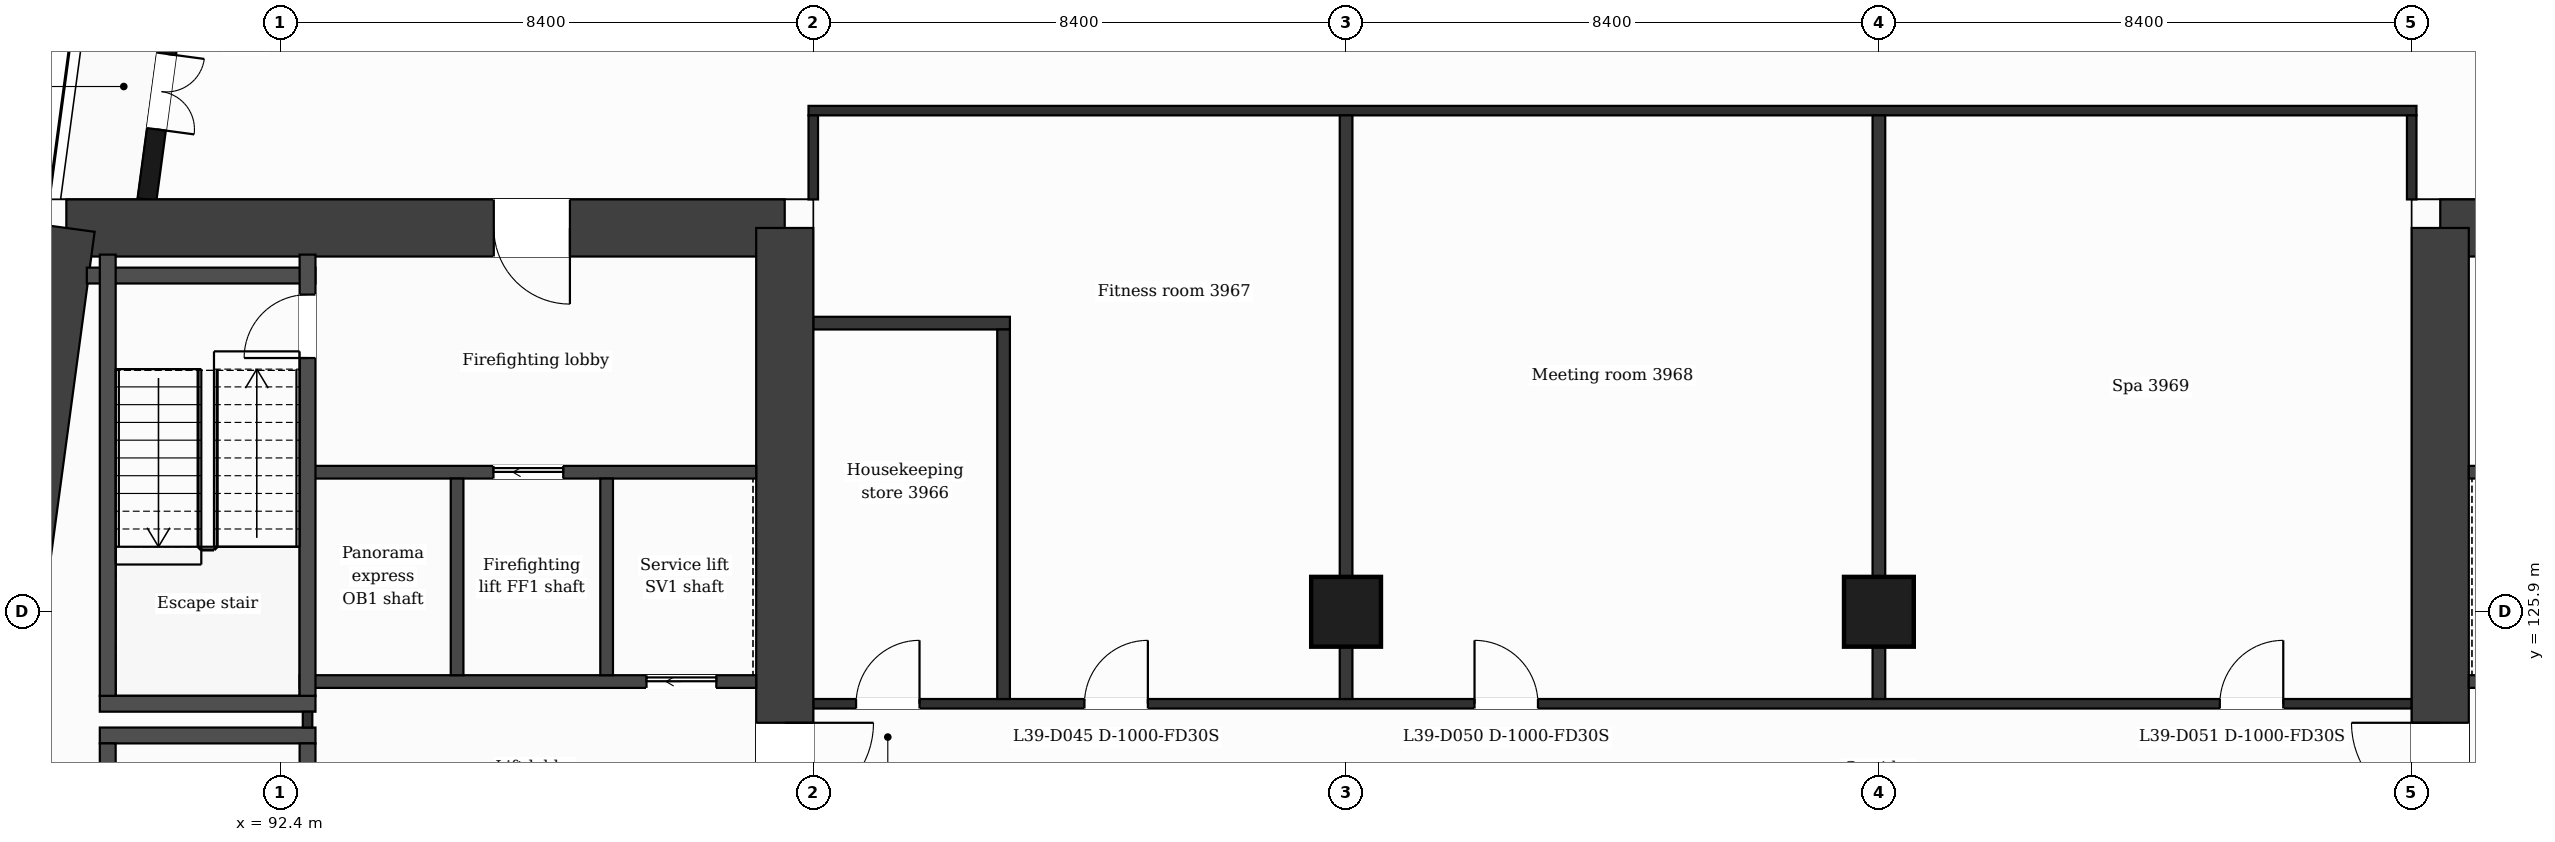
"""IFC4 building model, lengths in metres.
Left out: names, types, materials, properties, quantities, classifications, styles, units other than length and angle.
Written with IfcOpenShell. Run it as: python <this file> out.ifc"""

import sys

from ifc_helpers import new_model, si_unit, direction, frame, frame_2d, origin, origin_2d, place, context, subcontext, project, spatial, rectangle, extrude, element, fill, save


model = new_model("IFC4")
c1 = context("Model", 3, precision=1e-05, world=origin(), true_north=direction((0.0, 1.0)))
c2 = subcontext(c1, "Body", "Model", "MODEL_VIEW")
j1 = project(units=[si_unit("LENGTHUNIT", "METRE"), si_unit("PLANEANGLEUNIT", "RADIAN")], contexts=[c1])
p1 = place(None, origin())
s1 = spatial("IfcSite", under=j1, at=p1, CompositionType="ELEMENT")
p2 = place(p1, origin())
s2 = spatial("IfcBuilding", under=s1, at=p2, CompositionType="ELEMENT")
p3 = place(p2, frame((0.0, 0.0, 166.3)))
s3 = spatial("IfcBuildingStorey", under=s2, at=p3, CompositionType="ELEMENT", Elevation=166.3)
p4 = place(p3, frame((89.024, 131.95, 0.0), z_axis=(0.0, 0.0, 1.0), x_axis=(1.0, 0.0, 0.0)))
e1 = element("IfcWall", 1, at=p4, inside=s3, PredefinedType="SHEAR", context=c2, shape_type="SweptSolid", body=[
    extrude(rectangle(XDim=11.326, YDim=0.9, at=frame_2d((5.663, 0.0))), origin(), (0.0, 0.0, 1.0), 3.7),
])
p5 = place(p4, frame((6.739, 0.0, 0.0)))
e2 = element("IfcOpeningElement", 2, at=p5, cuts=e1, PredefinedType="OPENING", context=c2, shape_type="SweptSolid", body=[
    extrude(rectangle(XDim=1.2, YDim=2.1, at=frame_2d((0.6, 1.05))), frame((0.0, 0.46, 0.0), z_axis=(0.0, -1.0, 0.0), x_axis=(1.0, 0.0, 0.0)), (0.0, 0.0, 1.0), 0.92),
])
p6 = place(p3, frame((100.35, 131.95, 0.0), z_axis=(0.0, 0.0, 1.0), x_axis=(0.0, -1.0, 0.0)))
e3 = element("IfcWall", 3, at=p6, inside=s3, PredefinedType="SHEAR", context=c2, shape_type="SweptSolid", body=[
    extrude(rectangle(XDim=21.1, YDim=0.9, at=frame_2d((10.55, 0.0))), origin(), (0.0, 0.0, 1.0), 3.7),
])
p7 = place(p6, frame((7.8, 0.0, 0.0)))
e4 = element("IfcOpeningElement", 4, at=p7, cuts=e3, PredefinedType="OPENING", context=c2, shape_type="SweptSolid", body=[
    extrude(rectangle(XDim=1.4, YDim=2.1, at=frame_2d((0.7, 1.05))), frame((0.0, 0.46, 0.0), z_axis=(0.0, -1.0, 0.0), x_axis=(1.0, 0.0, 0.0)), (0.0, 0.0, 1.0), 0.92),
])
p8 = place(p3, frame((86.184, 110.85, 0.0), z_axis=(0.0, 0.0, 1.0), x_axis=(0.133410495943, 0.991060865725, 0.0)))
e5 = element("IfcWall", 5, at=p8, inside=s3, PredefinedType="SHEAR", context=c2, shape_type="SweptSolid", body=[
    extrude(rectangle(XDim=21.29, YDim=0.9, at=frame_2d((10.645, 0.0))), origin(), (0.0, 0.0, 1.0), 3.7),
])
p9 = place(p3, frame((126.45, 131.95, 0.0), z_axis=(0.0, 0.0, 1.0), x_axis=(1.0, 0.0, 0.0)))
e6 = element("IfcWall", 6, at=p9, inside=s3, PredefinedType="SHEAR", context=c2, shape_type="SweptSolid", body=[
    extrude(rectangle(XDim=11.326, YDim=0.9, at=frame_2d((5.663, 0.0))), origin(), (0.0, 0.0, 1.0), 3.7),
])
p10 = place(p9, frame((3.386, 0.0, 0.0)))
e7 = element("IfcOpeningElement", 7, at=p10, cuts=e6, PredefinedType="OPENING", context=c2, shape_type="SweptSolid", body=[
    extrude(rectangle(XDim=1.2, YDim=2.1, at=frame_2d((0.6, 1.05))), frame((0.0, 0.46, 0.0), z_axis=(0.0, -1.0, 0.0), x_axis=(1.0, 0.0, 0.0)), (0.0, 0.0, 1.0), 0.92),
])
p11 = place(p3, frame((126.45, 110.85, 0.0), z_axis=(0.0, 0.0, 1.0), x_axis=(0.0, 1.0, 0.0)))
e8 = element("IfcWall", 8, at=p11, inside=s3, PredefinedType="SHEAR", context=c2, shape_type="SweptSolid", body=[
    extrude(rectangle(XDim=21.1, YDim=0.9, at=frame_2d((10.55, 0.0))), origin(), (0.0, 0.0, 1.0), 3.7),
])
p12 = place(p11, frame((11.9, 0.0, 0.0)))
e9 = element("IfcOpeningElement", 9, at=p12, cuts=e8, PredefinedType="OPENING", context=c2, shape_type="SweptSolid", body=[
    extrude(rectangle(XDim=1.4, YDim=2.1, at=frame_2d((0.7, 1.05))), frame((0.0, 0.46, 0.0), z_axis=(0.0, -1.0, 0.0), x_axis=(1.0, 0.0, 0.0)), (0.0, 0.0, 1.0), 0.92),
])
for number, where, z_axis, x_axis in (
    (10, (109.2, 125.9, 0.0), (0.0, 0.0, 1.0), (1.0, 0.0, 0.0)),
    (11, (117.6, 125.9, 0.0), (0.0, 0.0, 1.0), (1.0, 0.0, 0.0)),
):
    element("IfcColumn", number, at=place(p3, frame(where, z_axis=z_axis, x_axis=x_axis)), inside=s3, PredefinedType="COLUMN", context=c2, shape_type="SweptSolid", body=[
        extrude(rectangle(XDim=1.1, YDim=1.1, at=origin_2d()), origin(), (0.0, 0.0, 1.0), 3.7),
    ])
p13 = place(p3, frame((91.177, 138.95, 0.0), z_axis=(0.0, 0.0, 1.0), x_axis=(-0.133426664613, -0.991058689065, 0.0)))
e12 = element("IfcWall", 12, at=p13, inside=s3, PredefinedType="SOLIDWALL", context=c2, shape_type="SweptSolid", body=[
    extrude(rectangle(XDim=6.609, YDim=0.3, at=frame_2d((3.305, 0.0))), origin(), (0.0, 0.0, 1.0), 3.38),
])
p14 = place(p13, frame((1.039, 0.0, 0.9)))
e13 = element("IfcOpeningElement", 13, at=p14, cuts=e12, PredefinedType="OPENING", context=c2, shape_type="SweptSolid", body=[
    extrude(rectangle(XDim=1.2, YDim=2.1, at=frame_2d((0.6, 1.05))), frame((0.0, 0.16, 0.0), z_axis=(0.0, -1.0, 0.0), x_axis=(1.0, 0.0, 0.0)), (0.0, 0.0, 1.0), 0.32),
])
p15 = place(p13, frame((4.294, 0.0, 0.0)))
e14 = element("IfcOpeningElement", 14, at=p15, cuts=e12, PredefinedType="OPENING", context=c2, shape_type="SweptSolid", body=[
    extrude(rectangle(XDim=1.2, YDim=2.4, at=frame_2d((0.6, 1.2))), frame((0.0, 0.16, 0.0), z_axis=(0.0, -1.0, 0.0), x_axis=(1.0, 0.0, 0.0)), (0.0, 0.0, 1.0), 0.32),
])
for number, where, z_axis, x_axis in (
    (15, (89.552, 123.95, 0.0), (0.0, 0.0, 1.0), (1.0, 0.0, 0.0)),
    (16, (89.552, 124.45, 0.0), (0.0, 0.0, 1.0), (1.0, 0.0, 0.0)),
):
    element("IfcWall", number, at=place(p3, frame(where, z_axis=z_axis, x_axis=x_axis)), inside=s3, PredefinedType="PARTITIONING", context=c2, shape_type="SweptSolid", body=[
        extrude(rectangle(XDim=3.4, YDim=0.25, at=frame_2d((1.7, 0.0))), origin(), (0.0, 0.0, 1.0), 3.38),
    ])
p16 = place(p3, frame((100.8, 124.45, 0.0), z_axis=(0.0, 0.0, 1.0), x_axis=(1.0, 0.0, 0.0)))
e17 = element("IfcWall", 17, at=p16, inside=s3, PredefinedType="PARTITIONING", context=c2, shape_type="SweptSolid", body=[
    extrude(rectangle(XDim=25.2, YDim=0.15, at=frame_2d((12.6, 0.0))), origin(), (0.0, 0.0, 1.0), 3.38),
])
p17 = place(p16, frame((4.275, 0.0, 0.0)))
e18 = element("IfcOpeningElement", 18, at=p17, cuts=e17, PredefinedType="OPENING", context=c2, shape_type="SweptSolid", body=[
    extrude(rectangle(XDim=1.0, YDim=2.1, at=frame_2d((0.5, 1.05))), frame((0.0, 0.085, 0.0), z_axis=(0.0, -1.0, 0.0), x_axis=(1.0, 0.0, 0.0)), (0.0, 0.0, 1.0), 0.17),
])
p18 = place(p16, frame((0.675, 0.0, 0.0)))
e19 = element("IfcOpeningElement", 19, at=p18, cuts=e17, PredefinedType="OPENING", context=c2, shape_type="SweptSolid", body=[
    extrude(rectangle(XDim=1.0, YDim=2.1, at=frame_2d((0.5, 1.05))), frame((0.0, 0.085, 0.0), z_axis=(0.0, -1.0, 0.0), x_axis=(1.0, 0.0, 0.0)), (0.0, 0.0, 1.0), 0.17),
])
p19 = place(p16, frame((10.425, 0.0, 0.0)))
e20 = element("IfcOpeningElement", 20, at=p19, cuts=e17, PredefinedType="OPENING", context=c2, shape_type="SweptSolid", body=[
    extrude(rectangle(XDim=1.0, YDim=2.1, at=frame_2d((0.5, 1.05))), frame((0.0, 0.085, 0.0), z_axis=(0.0, -1.0, 0.0), x_axis=(1.0, 0.0, 0.0)), (0.0, 0.0, 1.0), 0.17),
])
p20 = place(p16, frame((22.175, 0.0, 0.0)))
e21 = element("IfcOpeningElement", 21, at=p20, cuts=e17, PredefinedType="OPENING", context=c2, shape_type="SweptSolid", body=[
    extrude(rectangle(XDim=1.0, YDim=2.1, at=frame_2d((0.5, 1.05))), frame((0.0, 0.085, 0.0), z_axis=(0.0, -1.0, 0.0), x_axis=(1.0, 0.0, 0.0)), (0.0, 0.0, 1.0), 0.17),
])
p21 = place(p3, frame((92.702, 124.8, 0.0), z_axis=(0.0, 0.0, 1.0), x_axis=(1.0, 0.0, 0.0)))
e22 = element("IfcWall", 22, at=p21, inside=s3, PredefinedType="PARTITIONING", context=c2, shape_type="SweptSolid", body=[
    extrude(rectangle(XDim=7.198, YDim=0.2, at=frame_2d((3.599, 0.0))), origin(), (0.0, 0.0, 1.0), 3.38),
])
p22 = place(p21, frame((5.469, 0.0, 0.0)))
e23 = element("IfcOpeningElement", 23, at=p22, cuts=e22, PredefinedType="OPENING", context=c2, shape_type="SweptSolid", body=[
    extrude(rectangle(XDim=1.1, YDim=2.1, at=frame_2d((0.55, 1.05))), frame((0.0, 0.11, 0.0), z_axis=(0.0, -1.0, 0.0), x_axis=(1.0, 0.0, 0.0)), (0.0, 0.0, 1.0), 0.22),
])
p23 = place(p3, frame((126.9, 124.8, 0.0), z_axis=(0.0, 0.0, 1.0), x_axis=(1.0, 0.0, 0.0)))
e24 = element("IfcWall", 24, at=p23, inside=s3, PredefinedType="PARTITIONING", context=c2, shape_type="SweptSolid", body=[
    extrude(rectangle(XDim=4.715, YDim=0.2, at=frame_2d((2.358, 0.0))), origin(), (0.0, 0.0, 1.0), 3.38),
])
p24 = place(p23, frame((0.629, 0.0, 0.0)))
e25 = element("IfcOpeningElement", 25, at=p24, cuts=e24, PredefinedType="OPENING", context=c2, shape_type="SweptSolid", body=[
    extrude(rectangle(XDim=1.1, YDim=2.1, at=frame_2d((0.55, 1.05))), frame((0.0, 0.11, 0.0), z_axis=(0.0, -1.0, 0.0), x_axis=(1.0, 0.0, 0.0)), (0.0, 0.0, 1.0), 0.22),
])
p25 = place(p3, frame((92.827, 128.1, 0.0), z_axis=(0.0, 0.0, 1.0), x_axis=(1.0, 0.0, 0.0)))
e26 = element("IfcWall", 26, at=p25, inside=s3, PredefinedType="PARTITIONING", context=c2, shape_type="SweptSolid", body=[
    extrude(rectangle(XDim=7.073, YDim=0.2, at=frame_2d((3.537, 0.0))), origin(), (0.0, 0.0, 1.0), 3.38),
])
p26 = place(p25, frame((2.931, 0.0, 0.0)))
e27 = element("IfcOpeningElement", 27, at=p26, cuts=e26, PredefinedType="OPENING", context=c2, shape_type="SweptSolid", body=[
    extrude(rectangle(XDim=1.1, YDim=2.1, at=frame_2d((0.55, 1.05))), frame((0.0, 0.11, 0.0), z_axis=(0.0, -1.0, 0.0), x_axis=(1.0, 0.0, 0.0)), (0.0, 0.0, 1.0), 0.22),
])
p27 = place(p3, frame((126.9, 128.1, 0.0), z_axis=(0.0, 0.0, 1.0), x_axis=(1.0, 0.0, 0.0)))
e28 = element("IfcWall", 28, at=p27, inside=s3, PredefinedType="PARTITIONING", context=c2, shape_type="SweptSolid", body=[
    extrude(rectangle(XDim=4.715, YDim=0.2, at=frame_2d((2.358, 0.0))), origin(), (0.0, 0.0, 1.0), 3.38),
])
p28 = place(p27, frame((2.847, 0.0, 0.0)))
e29 = element("IfcOpeningElement", 29, at=p28, cuts=e28, PredefinedType="OPENING", context=c2, shape_type="SweptSolid", body=[
    extrude(rectangle(XDim=1.1, YDim=2.1, at=frame_2d((0.55, 1.05))), frame((0.0, 0.11, 0.0), z_axis=(0.0, -1.0, 0.0), x_axis=(1.0, 0.0, 0.0)), (0.0, 0.0, 1.0), 0.22),
])
p29 = place(p3, frame((100.8, 130.45, 0.0), z_axis=(0.0, 0.0, 1.0), x_axis=(1.0, 0.0, 0.0)))
e30 = element("IfcWall", 30, at=p29, inside=s3, PredefinedType="PARTITIONING", context=c2, shape_type="SweptSolid", body=[
    extrude(rectangle(XDim=3.1, YDim=0.2, at=frame_2d((1.55, 0.0))), origin(), (0.0, 0.0, 1.0), 3.38),
])
p30 = place(p3, frame((89.347, 131.2, 0.0), z_axis=(0.0, 0.0, 1.0), x_axis=(1.0, 0.0, 0.0)))
e31 = element("IfcWall", 31, at=p30, inside=s3, PredefinedType="PARTITIONING", context=c2, shape_type="SweptSolid", body=[
    extrude(rectangle(XDim=3.604, YDim=0.25, at=frame_2d((1.802, 0.0))), origin(), (0.0, 0.0, 1.0), 3.38),
])
p31 = place(p3, frame((100.725, 133.8, 0.0), z_axis=(0.0, 0.0, 1.0), x_axis=(1.0, 0.0, 0.0)))
e32 = element("IfcWall", 32, at=p31, inside=s3, PredefinedType="PARTITIONING", context=c2, shape_type="SweptSolid", body=[
    extrude(rectangle(XDim=25.35, YDim=0.15, at=frame_2d((12.675, 0.0))), origin(), (0.0, 0.0, 1.0), 3.38),
])
p32 = place(p3, frame((89.677, 116.87, 0.0), z_axis=(0.0, 0.0, 1.0), x_axis=(0.0, 1.0, 0.0)))
e33 = element("IfcWall", 33, at=p32, inside=s3, PredefinedType="PARTITIONING", context=c2, shape_type="SweptSolid", body=[
    extrude(rectangle(XDim=6.955, YDim=0.25, at=frame_2d((3.478, 0.0))), origin(), (0.0, 0.0, 1.0), 3.38),
])
p33 = place(p3, frame((89.677, 124.575, 0.0), z_axis=(0.0, 0.0, 1.0), x_axis=(0.0, 1.0, 0.0)))
e34 = element("IfcWall", 34, at=p33, inside=s3, PredefinedType="PARTITIONING", context=c2, shape_type="SweptSolid", body=[
    extrude(rectangle(XDim=6.955, YDim=0.25, at=frame_2d((3.478, 0.0))), origin(), (0.0, 0.0, 1.0), 3.38),
])
p34 = place(p3, frame((92.827, 124.075, 0.0), z_axis=(0.0, 0.0, 1.0), x_axis=(0.0, 1.0, 0.0)))
e35 = element("IfcWall", 35, at=p34, inside=s3, PredefinedType="PARTITIONING", context=c2, shape_type="SweptSolid", body=[
    extrude(rectangle(XDim=0.25, YDim=0.15, at=frame_2d((0.125, 0.0))), origin(), (0.0, 0.0, 1.0), 3.38),
])
p35 = place(p3, frame((92.827, 116.87, 0.0), z_axis=(0.0, 0.0, 1.0), x_axis=(0.0, 1.0, 0.0)))
e36 = element("IfcWall", 36, at=p35, inside=s3, PredefinedType="PARTITIONING", context=c2, shape_type="SweptSolid", body=[
    extrude(rectangle(XDim=6.955, YDim=0.25, at=frame_2d((3.478, 0.0))), origin(), (0.0, 0.0, 1.0), 3.38),
])
p36 = place(p35, frame((5.655, 0.0, 0.0)))
e37 = element("IfcOpeningElement", 37, at=p36, cuts=e36, PredefinedType="OPENING", context=c2, shape_type="SweptSolid", body=[
    extrude(rectangle(XDim=0.95, YDim=2.1, at=frame_2d((0.475, 1.05))), frame((0.0, 0.135, 0.0), z_axis=(0.0, -1.0, 0.0), x_axis=(1.0, 0.0, 0.0)), (0.0, 0.0, 1.0), 0.27),
])
p37 = place(p3, frame((92.827, 124.575, 0.0), z_axis=(0.0, 0.0, 1.0), x_axis=(0.0, 1.0, 0.0)))
e38 = element("IfcWall", 38, at=p37, inside=s3, PredefinedType="PARTITIONING", context=c2, shape_type="SweptSolid", body=[
    extrude(rectangle(XDim=6.955, YDim=0.25, at=frame_2d((3.478, 0.0))), origin(), (0.0, 0.0, 1.0), 3.38),
])
p38 = place(p37, frame((5.325, 0.0, 0.0)))
e39 = element("IfcOpeningElement", 39, at=p38, cuts=e38, PredefinedType="OPENING", context=c2, shape_type="SweptSolid", body=[
    extrude(rectangle(XDim=1.0, YDim=2.1, at=frame_2d((0.5, 1.05))), frame((0.0, 0.135, 0.0), z_axis=(0.0, -1.0, 0.0), x_axis=(1.0, 0.0, 0.0)), (0.0, 0.0, 1.0), 0.27),
])
for number, where, z_axis, x_axis in (
    (40, (95.185, 124.9, 0.0), (0.0, 0.0, 1.0), (0.0, 1.0, 0.0)),
    (41, (97.542, 124.9, 0.0), (0.0, 0.0, 1.0), (0.0, 1.0, 0.0)),
):
    element("IfcWall", number, at=place(p3, frame(where, z_axis=z_axis, x_axis=x_axis)), inside=s3, PredefinedType="PARTITIONING", context=c2, shape_type="SweptSolid", body=[
        extrude(rectangle(XDim=3.1, YDim=0.2, at=frame_2d((1.55, 0.0))), origin(), (0.0, 0.0, 1.0), 3.38),
    ])
p39 = place(p3, frame((100.8, 132.4, 0.0), z_axis=(0.0, 0.0, 1.0), x_axis=(0.0, 1.0, 0.0)))
e42 = element("IfcWall", 42, at=p39, inside=s3, PredefinedType="PARTITIONING", context=c2, shape_type="SweptSolid", body=[
    extrude(rectangle(XDim=1.325, YDim=0.15, at=frame_2d((0.663, 0.0))), origin(), (0.0, 0.0, 1.0), 3.38),
])
p40 = place(p3, frame((103.8, 124.525, 0.0), z_axis=(0.0, 0.0, 1.0), x_axis=(0.0, 1.0, 0.0)))
e43 = element("IfcWall", 43, at=p40, inside=s3, PredefinedType="PARTITIONING", context=c2, shape_type="SweptSolid", body=[
    extrude(rectangle(XDim=5.825, YDim=0.2, at=frame_2d((2.913, 0.0))), origin(), (0.0, 0.0, 1.0), 3.38),
])
for number, where, z_axis, x_axis in (
    (44, (109.2, 124.525, 0.0), (0.0, 0.0, 1.0), (0.0, 1.0, 0.0)),
    (45, (117.6, 124.525, 0.0), (0.0, 0.0, 1.0), (0.0, 1.0, 0.0)),
):
    element("IfcWall", number, at=place(p3, frame(where, z_axis=z_axis, x_axis=x_axis)), inside=s3, PredefinedType="PARTITIONING", context=c2, shape_type="SweptSolid", body=[
        extrude(rectangle(XDim=9.2, YDim=0.2, at=frame_2d((4.6, 0.0))), origin(), (0.0, 0.0, 1.0), 3.38),
    ])
p41 = place(p3, frame((126.0, 132.4, 0.0), z_axis=(0.0, 0.0, 1.0), x_axis=(0.0, 1.0, 0.0)))
e46 = element("IfcWall", 46, at=p41, inside=s3, PredefinedType="PARTITIONING", context=c2, shape_type="SweptSolid", body=[
    extrude(rectangle(XDim=1.325, YDim=0.15, at=frame_2d((0.663, 0.0))), origin(), (0.0, 0.0, 1.0), 3.38),
])
p42 = place(p15, origin())
e47 = element("IfcDoor", 47, at=p42, inside=s3, OperationType="DOUBLE_DOOR_SINGLE_SWING", PredefinedType="DOOR", context=c2, shape_type="SweptSolid", body=[
    extrude(rectangle(XDim=1.2, YDim=2.4, at=frame_2d((0.6, 1.2))), frame((0.0, 0.025, 0.0), z_axis=(0.0, -1.0, 0.0), x_axis=(1.0, 0.0, 0.0)), (0.0, 0.0, 1.0), 0.05),
])
fill(e14, e47)
p43 = place(p26, origin())
e48 = element("IfcDoor", 48, at=p43, inside=s3, OperationType="SLIDING_TO_LEFT", PredefinedType="DOOR", context=c2, shape_type="SweptSolid", body=[
    extrude(rectangle(XDim=1.1, YDim=2.1, at=frame_2d((0.55, 1.05))), frame((0.0, 0.025, 0.0), z_axis=(0.0, -1.0, 0.0), x_axis=(1.0, 0.0, 0.0)), (0.0, 0.0, 1.0), 0.05),
])
fill(e27, e48)
p44 = place(p22, origin())
e49 = element("IfcDoor", 49, at=p44, inside=s3, OperationType="SLIDING_TO_LEFT", PredefinedType="DOOR", context=c2, shape_type="SweptSolid", body=[
    extrude(rectangle(XDim=1.1, YDim=2.1, at=frame_2d((0.55, 1.05))), frame((0.0, 0.025, 0.0), z_axis=(0.0, -1.0, 0.0), x_axis=(1.0, 0.0, 0.0)), (0.0, 0.0, 1.0), 0.05),
])
fill(e23, e49)
p45 = place(p38, origin())
e50 = element("IfcDoor", 50, at=p45, inside=s3, OperationType="SINGLE_SWING_LEFT", PredefinedType="DOOR", context=c2, shape_type="SweptSolid", body=[
    extrude(rectangle(XDim=1.0, YDim=2.1, at=frame_2d((0.5, 1.05))), frame((0.0, 0.025, 0.0), z_axis=(0.0, -1.0, 0.0), x_axis=(1.0, 0.0, 0.0)), (0.0, 0.0, 1.0), 0.05),
])
fill(e39, e50)
p46 = place(p17, origin())
e51 = element("IfcDoor", 51, at=p46, inside=s3, OperationType="SINGLE_SWING_RIGHT", PredefinedType="DOOR", context=c2, shape_type="SweptSolid", body=[
    extrude(rectangle(XDim=1.0, YDim=2.1, at=frame_2d((0.5, 1.05))), frame((0.0, 0.025, 0.0), z_axis=(0.0, -1.0, 0.0), x_axis=(1.0, 0.0, 0.0)), (0.0, 0.0, 1.0), 0.05),
])
fill(e18, e51)
p47 = place(p18, origin())
e52 = element("IfcDoor", 52, at=p47, inside=s3, OperationType="SINGLE_SWING_RIGHT", PredefinedType="DOOR", context=c2, shape_type="SweptSolid", body=[
    extrude(rectangle(XDim=1.0, YDim=2.1, at=frame_2d((0.5, 1.05))), frame((0.0, 0.025, 0.0), z_axis=(0.0, -1.0, 0.0), x_axis=(1.0, 0.0, 0.0)), (0.0, 0.0, 1.0), 0.05),
])
fill(e19, e52)
p48 = place(p19, origin())
e53 = element("IfcDoor", 53, at=p48, inside=s3, OperationType="SINGLE_SWING_LEFT", PredefinedType="DOOR", context=c2, shape_type="SweptSolid", body=[
    extrude(rectangle(XDim=1.0, YDim=2.1, at=frame_2d((0.5, 1.05))), frame((0.0, 0.025, 0.0), z_axis=(0.0, -1.0, 0.0), x_axis=(1.0, 0.0, 0.0)), (0.0, 0.0, 1.0), 0.05),
])
fill(e20, e53)
p49 = place(p20, origin())
e54 = element("IfcDoor", 54, at=p49, inside=s3, OperationType="SINGLE_SWING_RIGHT", PredefinedType="DOOR", context=c2, shape_type="SweptSolid", body=[
    extrude(rectangle(XDim=1.0, YDim=2.1, at=frame_2d((0.5, 1.05))), frame((0.0, 0.025, 0.0), z_axis=(0.0, -1.0, 0.0), x_axis=(1.0, 0.0, 0.0)), (0.0, 0.0, 1.0), 0.05),
])
fill(e21, e54)
p50 = place(p5, origin())
e55 = element("IfcDoor", 55, at=p50, inside=s3, OperationType="SINGLE_SWING_RIGHT", PredefinedType="DOOR", context=c2, shape_type="SweptSolid", body=[
    extrude(rectangle(XDim=1.2, YDim=2.1, at=frame_2d((0.6, 1.05))), frame((0.0, 0.025, 0.0), z_axis=(0.0, -1.0, 0.0), x_axis=(1.0, 0.0, 0.0)), (0.0, 0.0, 1.0), 0.05),
])
fill(e2, e55)
p51 = place(p7, origin())
e56 = element("IfcDoor", 56, at=p51, inside=s3, OperationType="SINGLE_SWING_LEFT", PredefinedType="DOOR", context=c2, shape_type="SweptSolid", body=[
    extrude(rectangle(XDim=1.4, YDim=2.1, at=frame_2d((0.7, 1.05))), frame((0.0, 0.025, 0.0), z_axis=(0.0, -1.0, 0.0), x_axis=(1.0, 0.0, 0.0)), (0.0, 0.0, 1.0), 0.05),
])
fill(e4, e56)
p52 = place(p12, origin())
e57 = element("IfcDoor", 57, at=p52, inside=s3, OperationType="SINGLE_SWING_RIGHT", PredefinedType="DOOR", context=c2, shape_type="SweptSolid", body=[
    extrude(rectangle(XDim=1.4, YDim=2.1, at=frame_2d((0.7, 1.05))), frame((0.0, 0.025, 0.0), z_axis=(0.0, -1.0, 0.0), x_axis=(1.0, 0.0, 0.0)), (0.0, 0.0, 1.0), 0.05),
])
fill(e9, e57)
save(model, sys.argv[1])
